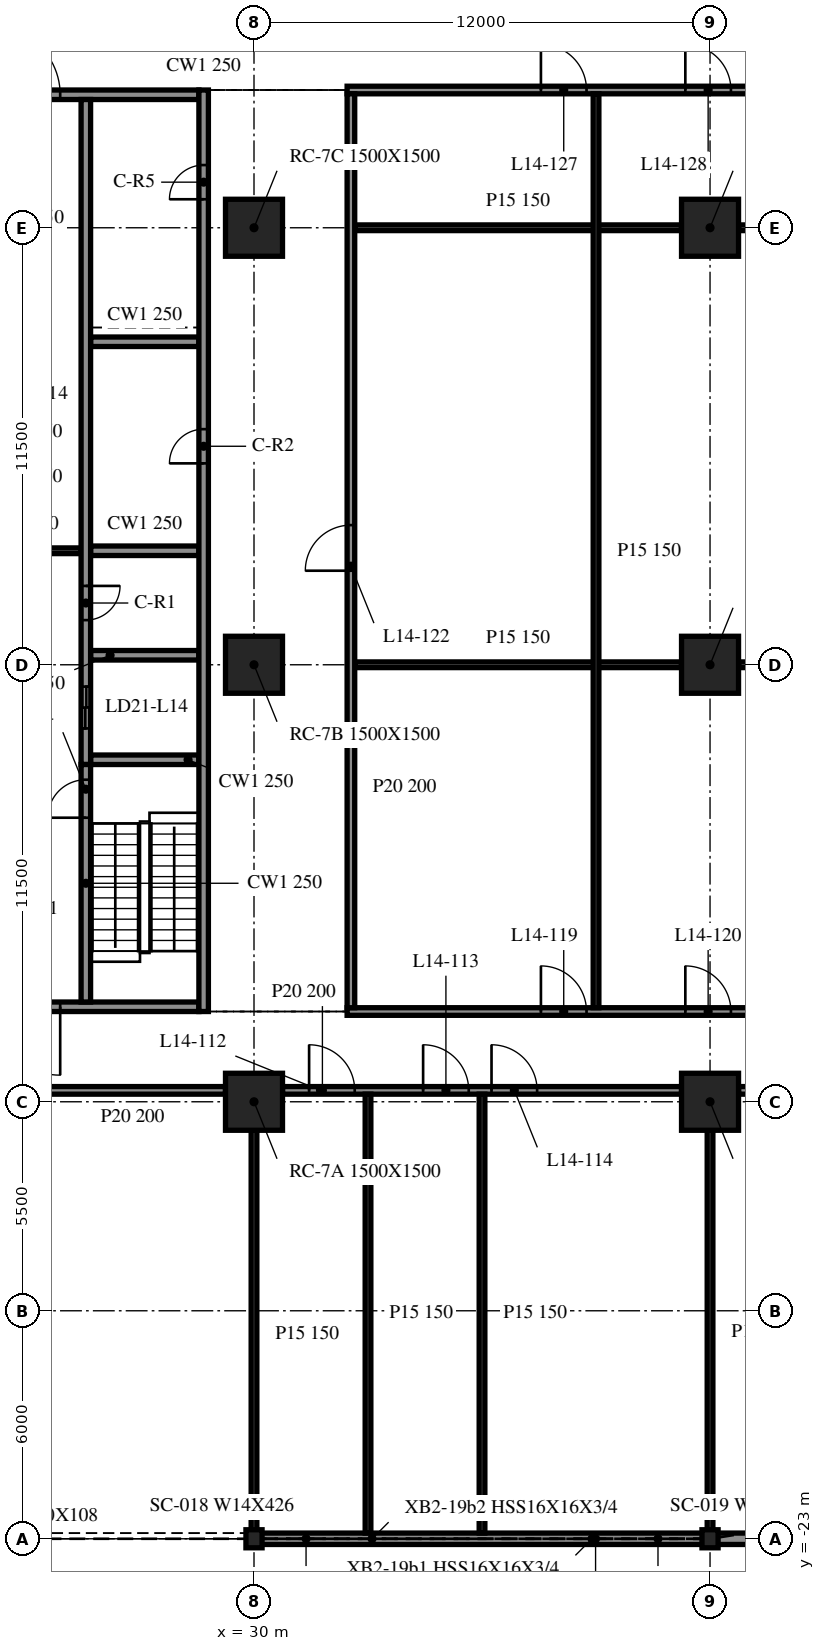
"""IFC4 building model, lengths in metres.
Left out: names, types, materials, properties, quantities, classifications, styles, units other than length and angle.
Written with IfcOpenShell. Run it as: python <this file> out.ifc"""

import sys

from ifc_helpers import new_model, si_unit, direction, frame, frame_2d, origin, origin_2d, place, context, subcontext, project, spatial, rectangle, i_section, extrude, element, fill, save


model = new_model("IFC4")
c1 = context("Model", 3, precision=1e-05, world=origin(), true_north=direction((0.0, 1.0)))
c2 = subcontext(c1, "Body", "Model", "MODEL_VIEW")
j1 = project(units=[si_unit("LENGTHUNIT", "METRE"), si_unit("PLANEANGLEUNIT", "RADIAN")], contexts=[c1])
p1 = place(None, origin())
s1 = spatial("IfcSite", under=j1, at=p1, CompositionType="ELEMENT")
p2 = place(p1, origin())
s2 = spatial("IfcBuilding", under=s1, at=p2, CompositionType="ELEMENT")
p3 = place(p2, frame((0.0, 0.0, 63.2)))
s3 = spatial("IfcBuildingStorey", under=s2, at=p3, CompositionType="ELEMENT", Elevation=63.2)
for number, where, z_axis, x_axis in (
    (1, (30.0, -11.5, -0.34), (0.0, 0.0, 1.0), (1.0, 0.0, 0.0)),
    (2, (30.0, 0.0, -0.34), (0.0, 0.0, 1.0), (1.0, 0.0, 0.0)),
    (3, (30.0, 11.5, -0.34), (0.0, 0.0, 1.0), (1.0, 0.0, 0.0)),
    (4, (42.0, -11.5, -0.34), (0.0, 0.0, 1.0), (1.0, 0.0, 0.0)),
    (5, (42.0, 0.0, -0.34), (0.0, 0.0, 1.0), (1.0, 0.0, 0.0)),
    (6, (42.0, 11.5, -0.34), (0.0, 0.0, 1.0), (1.0, 0.0, 0.0)),
):
    element("IfcColumn", number, at=place(p3, frame(where, z_axis=z_axis, x_axis=x_axis)), inside=s3, PredefinedType="COLUMN", context=c2, shape_type="SweptSolid", body=[
        extrude(rectangle(XDim=1.5, YDim=1.5, at=origin_2d()), origin(), (0.0, 0.0, 1.0), 4.3),
    ])
for number, where, z_axis, x_axis in (
    (7, (30.0, -23.0, -0.34), (0.0, 0.0, 1.0), (1.0, 0.0, 0.0)),
    (8, (42.0, -23.0, -0.34), (0.0, 0.0, 1.0), (1.0, 0.0, 0.0)),
):
    element("IfcColumn", number, at=place(p3, frame(where, z_axis=z_axis, x_axis=x_axis)), inside=s3, PredefinedType="COLUMN", context=c2, shape_type="SweptSolid", body=[
        extrude(i_section(OverallWidth=0.424, OverallDepth=0.475, WebThickness=0.048, FlangeThickness=0.077, at=origin_2d()), origin(), (0.0, 0.0, 1.0), 4.3),
    ])
p4 = place(p3, frame((30.024, -23.0, 0.0), z_axis=(0.0, 0.0, 1.0), x_axis=(1.0, 0.0, 0.0)))
e9 = element("IfcWall", 9, at=p4, inside=s3, PredefinedType="NOTDEFINED", context=c2, shape_type="SweptSolid", body=[
    extrude(rectangle(XDim=11.952, YDim=0.3, at=frame_2d((5.976, 0.0))), origin(), (0.0, 0.0, 1.0), 3.203),
])
p5 = place(p3, frame((42.024, -23.0, 0.0), z_axis=(0.0, 0.0, 1.0), x_axis=(1.0, 0.0, 0.0)))
e10 = element("IfcWall", 10, at=p5, inside=s3, PredefinedType="NOTDEFINED", context=c2, shape_type="SweptSolid", body=[
    extrude(rectangle(XDim=5.976, YDim=0.3, at=frame_2d((2.988, 0.0))), origin(), (0.0, 0.0, 1.0), 3.203),
])
p6 = place(p3, frame((28.675, -9.125, 0.0), z_axis=(0.0, 0.0, 1.0), x_axis=(0.0, 1.0, 0.0)))
e11 = element("IfcWall", 11, at=p6, inside=s3, PredefinedType="SOLIDWALL", context=c2, shape_type="SweptSolid", body=[
    extrude(rectangle(XDim=24.25, YDim=0.25, at=frame_2d((12.125, 0.0))), origin(), (0.0, 0.0, 1.0), 3.96),
])
p7 = place(p6, frame((14.425, 0.0, 0.0)))
e12 = element("IfcOpeningElement", 12, at=p7, cuts=e11, PredefinedType="OPENING", context=c2, shape_type="SweptSolid", body=[
    extrude(rectangle(XDim=0.9, YDim=2.1, at=frame_2d((0.45, 1.05))), frame((0.0, 0.135, 0.0), z_axis=(0.0, -1.0, 0.0), x_axis=(1.0, 0.0, 0.0)), (0.0, 0.0, 1.0), 0.27),
])
p8 = place(p6, frame((21.375, 0.0, 0.0)))
e13 = element("IfcOpeningElement", 13, at=p8, cuts=e11, PredefinedType="OPENING", context=c2, shape_type="SweptSolid", body=[
    extrude(rectangle(XDim=0.9, YDim=2.1, at=frame_2d((0.45, 1.05))), frame((0.0, 0.135, 0.0), z_axis=(0.0, -1.0, 0.0), x_axis=(1.0, 0.0, 0.0)), (0.0, 0.0, 1.0), 0.27),
])
p9 = place(p3, frame((28.55, -9.0, 0.0), z_axis=(0.0, 0.0, 1.0), x_axis=(-1.0, 0.0, 0.0)))
e14 = element("IfcWall", 14, at=p9, inside=s3, PredefinedType="SOLIDWALL", context=c2, shape_type="SweptSolid", body=[
    extrude(rectangle(XDim=9.1, YDim=0.25, at=frame_2d((4.55, 0.0))), origin(), (0.0, 0.0, 1.0), 3.96),
])
p10 = place(p9, frame((3.65, 0.0, 0.0)))
e15 = element("IfcOpeningElement", 15, at=p10, cuts=e14, PredefinedType="OPENING", context=c2, shape_type="SweptSolid", body=[
    extrude(rectangle(XDim=1.8, YDim=2.1, at=frame_2d((0.9, 1.05))), frame((0.0, 0.135, 0.0), z_axis=(0.0, -1.0, 0.0), x_axis=(1.0, 0.0, 0.0)), (0.0, 0.0, 1.0), 0.27),
])
p11 = place(p3, frame((19.45, 15.0, 0.0), z_axis=(0.0, 0.0, 1.0), x_axis=(1.0, 0.0, 0.0)))
e16 = element("IfcWall", 16, at=p11, inside=s3, PredefinedType="SOLIDWALL", context=c2, shape_type="SweptSolid", body=[
    extrude(rectangle(XDim=9.1, YDim=0.25, at=frame_2d((4.55, 0.0))), origin(), (0.0, 0.0, 1.0), 3.96),
])
p12 = place(p11, frame((3.65, 0.0, 0.0)))
e17 = element("IfcOpeningElement", 17, at=p12, cuts=e16, PredefinedType="OPENING", context=c2, shape_type="SweptSolid", body=[
    extrude(rectangle(XDim=1.8, YDim=2.1, at=frame_2d((0.9, 1.05))), frame((0.0, 0.135, 0.0), z_axis=(0.0, -1.0, 0.0), x_axis=(1.0, 0.0, 0.0)), (0.0, 0.0, 1.0), 0.27),
])
p13 = place(p3, frame((25.575, -8.875, 0.0), z_axis=(0.0, 0.0, 1.0), x_axis=(0.0, 1.0, 0.0)))
e18 = element("IfcWall", 18, at=p13, inside=s3, PredefinedType="SOLIDWALL", context=c2, shape_type="SweptSolid", body=[
    extrude(rectangle(XDim=6.25, YDim=0.25, at=frame_2d((3.125, 0.0))), origin(), (0.0, 0.0, 1.0), 3.96),
])
p14 = place(p13, frame((4.85, 0.0, 0.0)))
e19 = element("IfcOpeningElement", 19, at=p14, cuts=e18, PredefinedType="OPENING", context=c2, shape_type="SweptSolid", body=[
    extrude(rectangle(XDim=1.0, YDim=2.1, at=frame_2d((0.5, 1.05))), frame((0.0, 0.135, 0.0), z_axis=(0.0, -1.0, 0.0), x_axis=(1.0, 0.0, 0.0)), (0.0, 0.0, 1.0), 0.27),
])
p15 = place(p3, frame((25.575, 14.875, 0.0), z_axis=(0.0, 0.0, 1.0), x_axis=(0.0, -1.0, 0.0)))
e20 = element("IfcWall", 20, at=p15, inside=s3, PredefinedType="SOLIDWALL", context=c2, shape_type="SweptSolid", body=[
    extrude(rectangle(XDim=17.5, YDim=0.25, at=frame_2d((8.75, 0.0))), origin(), (0.0, 0.0, 1.0), 3.96),
])
p16 = place(p15, frame((15.45, 0.0, 0.0)))
e21 = element("IfcOpeningElement", 21, at=p16, cuts=e20, PredefinedType="OPENING", context=c2, shape_type="SweptSolid", body=[
    extrude(rectangle(XDim=1.1, YDim=2.1, at=frame_2d((0.55, 1.05))), frame((0.0, 0.135, 0.0), z_axis=(0.0, -1.0, 0.0), x_axis=(1.0, 0.0, 0.0)), (0.0, 0.0, 1.0), 0.27),
])
p17 = place(p15, frame((12.8, 0.0, 0.0)))
e22 = element("IfcOpeningElement", 22, at=p17, cuts=e20, PredefinedType="OPENING", context=c2, shape_type="SweptSolid", body=[
    extrude(rectangle(XDim=0.9, YDim=2.1, at=frame_2d((0.45, 1.05))), frame((0.0, 0.135, 0.0), z_axis=(0.0, -1.0, 0.0), x_axis=(1.0, 0.0, 0.0)), (0.0, 0.0, 1.0), 0.27),
])
for number, where, z_axis, x_axis in (
    (23, (25.7, -2.5, 0.0), (0.0, 0.0, 1.0), (1.0, 0.0, 0.0)),
    (24, (25.7, 0.25, 0.0), (0.0, 0.0, 1.0), (1.0, 0.0, 0.0)),
    (25, (25.7, 3.0, 0.0), (0.0, 0.0, 1.0), (1.0, 0.0, 0.0)),
    (26, (25.7, 8.5, 0.0), (0.0, 0.0, 1.0), (1.0, 0.0, 0.0)),
):
    element("IfcWall", number, at=place(p3, frame(where, z_axis=z_axis, x_axis=x_axis)), inside=s3, PredefinedType="SOLIDWALL", context=c2, shape_type="SweptSolid", body=[
        extrude(rectangle(XDim=2.85, YDim=0.25, at=frame_2d((1.425, 0.0))), origin(), (0.0, 0.0, 1.0), 3.96),
    ])
p18 = place(p3, frame((22.55, 3.0, 0.0), z_axis=(0.0, 0.0, 1.0), x_axis=(1.0, 0.0, 0.0)))
e27 = element("IfcWall", 27, at=p18, inside=s3, PredefinedType="PARTITIONING", context=c2, shape_type="SweptSolid", body=[
    extrude(rectangle(XDim=2.9, YDim=0.15, at=frame_2d((1.45, 0.0))), origin(), (0.0, 0.0, 1.0), 3.96),
])
p19 = place(p3, frame((18.75, -11.2, 0.0), z_axis=(0.0, 0.0, 1.0), x_axis=(1.0, 0.0, 0.0)))
e28 = element("IfcWall", 28, at=p19, inside=s3, PredefinedType="PARTITIONING", context=c2, shape_type="SweptSolid", body=[
    extrude(rectangle(XDim=10.5, YDim=0.2, at=frame_2d((5.25, 0.0))), origin(), (0.0, 0.0, 1.0), 3.96),
])
p20 = place(p19, frame((4.7, 0.0, 0.0)))
e29 = element("IfcOpeningElement", 29, at=p20, cuts=e28, PredefinedType="OPENING", context=c2, shape_type="SweptSolid", body=[
    extrude(rectangle(XDim=1.0, YDim=2.1, at=frame_2d((0.5, 1.05))), frame((0.0, 0.11, 0.0), z_axis=(0.0, -1.0, 0.0), x_axis=(1.0, 0.0, 0.0)), (0.0, 0.0, 1.0), 0.22),
])
p21 = place(p3, frame((30.75, -11.2, 0.0), z_axis=(0.0, 0.0, 1.0), x_axis=(1.0, 0.0, 0.0)))
e30 = element("IfcWall", 30, at=p21, inside=s3, PredefinedType="PARTITIONING", context=c2, shape_type="SweptSolid", body=[
    extrude(rectangle(XDim=10.5, YDim=0.2, at=frame_2d((5.25, 0.0))), origin(), (0.0, 0.0, 1.0), 3.96),
])
p22 = place(p21, frame((0.7, 0.0, 0.0)))
e31 = element("IfcOpeningElement", 31, at=p22, cuts=e30, PredefinedType="OPENING", context=c2, shape_type="SweptSolid", body=[
    extrude(rectangle(XDim=1.2, YDim=2.1, at=frame_2d((0.6, 1.05))), frame((0.0, 0.11, 0.0), z_axis=(0.0, -1.0, 0.0), x_axis=(1.0, 0.0, 0.0)), (0.0, 0.0, 1.0), 0.22),
])
p23 = place(p21, frame((3.7, 0.0, 0.0)))
e32 = element("IfcOpeningElement", 32, at=p23, cuts=e30, PredefinedType="OPENING", context=c2, shape_type="SweptSolid", body=[
    extrude(rectangle(XDim=1.2, YDim=2.1, at=frame_2d((0.6, 1.05))), frame((0.0, 0.11, 0.0), z_axis=(0.0, -1.0, 0.0), x_axis=(1.0, 0.0, 0.0)), (0.0, 0.0, 1.0), 0.22),
])
p24 = place(p21, frame((5.5, 0.0, 0.0)))
e33 = element("IfcOpeningElement", 33, at=p24, cuts=e30, PredefinedType="OPENING", context=c2, shape_type="SweptSolid", body=[
    extrude(rectangle(XDim=1.2, YDim=2.1, at=frame_2d((0.6, 1.05))), frame((0.0, 0.11, 0.0), z_axis=(0.0, -1.0, 0.0), x_axis=(1.0, 0.0, 0.0)), (0.0, 0.0, 1.0), 0.22),
])
p25 = place(p3, frame((42.75, -11.2, 0.0), z_axis=(0.0, 0.0, 1.0), x_axis=(1.0, 0.0, 0.0)))
e34 = element("IfcWall", 34, at=p25, inside=s3, PredefinedType="PARTITIONING", context=c2, shape_type="SweptSolid", body=[
    extrude(rectangle(XDim=11.1, YDim=0.2, at=frame_2d((5.55, 0.0))), origin(), (0.0, 0.0, 1.0), 3.96),
])
p26 = place(p25, frame((4.9, 0.0, 0.0)))
e35 = element("IfcOpeningElement", 35, at=p26, cuts=e34, PredefinedType="OPENING", context=c2, shape_type="SweptSolid", body=[
    extrude(rectangle(XDim=1.2, YDim=2.1, at=frame_2d((0.6, 1.05))), frame((0.0, 0.11, 0.0), z_axis=(0.0, -1.0, 0.0), x_axis=(1.0, 0.0, 0.0)), (0.0, 0.0, 1.0), 0.22),
])
p27 = place(p3, frame((32.45, -9.125, 0.0), z_axis=(0.0, 0.0, 1.0), x_axis=(1.0, 0.0, 0.0)))
e36 = element("IfcWall", 36, at=p27, inside=s3, PredefinedType="PARTITIONING", context=c2, shape_type="SweptSolid", body=[
    extrude(rectangle(XDim=19.1, YDim=0.2, at=frame_2d((9.55, 0.0))), origin(), (0.0, 0.0, 1.0), 3.96),
])
p28 = place(p27, frame((5.1, 0.0, 0.0)))
e37 = element("IfcOpeningElement", 37, at=p28, cuts=e36, PredefinedType="OPENING", context=c2, shape_type="SweptSolid", body=[
    extrude(rectangle(XDim=1.2, YDim=2.1, at=frame_2d((0.6, 1.05))), frame((0.0, 0.11, 0.0), z_axis=(0.0, -1.0, 0.0), x_axis=(1.0, 0.0, 0.0)), (0.0, 0.0, 1.0), 0.22),
])
p29 = place(p27, frame((8.9, 0.0, 0.0)))
e38 = element("IfcOpeningElement", 38, at=p29, cuts=e36, PredefinedType="OPENING", context=c2, shape_type="SweptSolid", body=[
    extrude(rectangle(XDim=1.2, YDim=2.1, at=frame_2d((0.6, 1.05))), frame((0.0, 0.11, 0.0), z_axis=(0.0, -1.0, 0.0), x_axis=(1.0, 0.0, 0.0)), (0.0, 0.0, 1.0), 0.22),
])
for number, where, z_axis, x_axis in (
    (39, (32.65, 0.0, 0.0), (0.0, 0.0, 1.0), (1.0, 0.0, 0.0)),
    (40, (42.75, 0.0, 0.0), (0.0, 0.0, 1.0), (1.0, 0.0, 0.0)),
    (41, (32.65, 11.5, 0.0), (0.0, 0.0, 1.0), (1.0, 0.0, 0.0)),
    (42, (42.75, 11.5, 0.0), (0.0, 0.0, 1.0), (1.0, 0.0, 0.0)),
):
    element("IfcWall", number, at=place(p3, frame(where, z_axis=z_axis, x_axis=x_axis)), inside=s3, PredefinedType="PARTITIONING", context=c2, shape_type="SweptSolid", body=[
        extrude(rectangle(XDim=8.6, YDim=0.15, at=frame_2d((4.3, 0.0))), origin(), (0.0, 0.0, 1.0), 3.96),
    ])
p30 = place(p3, frame((32.45, 15.125, 0.0), z_axis=(0.0, 0.0, 1.0), x_axis=(1.0, 0.0, 0.0)))
e43 = element("IfcWall", 43, at=p30, inside=s3, PredefinedType="PARTITIONING", context=c2, shape_type="SweptSolid", body=[
    extrude(rectangle(XDim=19.1, YDim=0.2, at=frame_2d((9.55, 0.0))), origin(), (0.0, 0.0, 1.0), 3.96),
])
p31 = place(p30, frame((5.1, 0.0, 0.0)))
e44 = element("IfcOpeningElement", 44, at=p31, cuts=e43, PredefinedType="OPENING", context=c2, shape_type="SweptSolid", body=[
    extrude(rectangle(XDim=1.2, YDim=2.1, at=frame_2d((0.6, 1.05))), frame((0.0, 0.11, 0.0), z_axis=(0.0, -1.0, 0.0), x_axis=(1.0, 0.0, 0.0)), (0.0, 0.0, 1.0), 0.22),
])
p32 = place(p30, frame((8.9, 0.0, 0.0)))
e45 = element("IfcOpeningElement", 45, at=p32, cuts=e43, PredefinedType="OPENING", context=c2, shape_type="SweptSolid", body=[
    extrude(rectangle(XDim=1.2, YDim=2.1, at=frame_2d((0.6, 1.05))), frame((0.0, 0.11, 0.0), z_axis=(0.0, -1.0, 0.0), x_axis=(1.0, 0.0, 0.0)), (0.0, 0.0, 1.0), 0.22),
])
p33 = place(p3, frame((30.0, -22.975, 0.0), z_axis=(0.0, 0.0, 1.0), x_axis=(0.0, 1.0, 0.0)))
e46 = element("IfcWall", 46, at=p33, inside=s3, PredefinedType="PARTITIONING", context=c2, shape_type="SweptSolid", body=[
    extrude(rectangle(XDim=10.725, YDim=0.15, at=frame_2d((5.363, 0.0))), origin(), (0.0, 0.0, 1.0), 3.96),
])
p34 = place(p3, frame((32.55, -9.025, 0.0), z_axis=(0.0, 0.0, 1.0), x_axis=(0.0, 1.0, 0.0)))
e47 = element("IfcWall", 47, at=p34, inside=s3, PredefinedType="PARTITIONING", context=c2, shape_type="SweptSolid", body=[
    extrude(rectangle(XDim=24.05, YDim=0.2, at=frame_2d((12.025, 0.0))), origin(), (0.0, 0.0, 1.0), 3.96),
])
p35 = place(p34, frame((11.5, 0.0, 0.0)))
e48 = element("IfcOpeningElement", 48, at=p35, cuts=e47, PredefinedType="OPENING", context=c2, shape_type="SweptSolid", body=[
    extrude(rectangle(XDim=1.2, YDim=2.1, at=frame_2d((0.6, 1.05))), frame((0.0, 0.11, 0.0), z_axis=(0.0, -1.0, 0.0), x_axis=(1.0, 0.0, 0.0)), (0.0, 0.0, 1.0), 0.22),
])
for number, where, z_axis, x_axis in (
    (49, (33.0, -22.85, 0.0), (0.0, 0.0, 1.0), (0.0, 1.0, 0.0)),
    (50, (36.0, -22.85, 0.0), (0.0, 0.0, 1.0), (0.0, 1.0, 0.0)),
):
    element("IfcWall", number, at=place(p3, frame(where, z_axis=z_axis, x_axis=x_axis)), inside=s3, PredefinedType="PARTITIONING", context=c2, shape_type="SweptSolid", body=[
        extrude(rectangle(XDim=11.55, YDim=0.15, at=frame_2d((5.775, 0.0))), origin(), (0.0, 0.0, 1.0), 3.96),
    ])
p36 = place(p3, frame((39.0, -9.025, 0.0), z_axis=(0.0, 0.0, 1.0), x_axis=(0.0, 1.0, 0.0)))
e51 = element("IfcWall", 51, at=p36, inside=s3, PredefinedType="PARTITIONING", context=c2, shape_type="SweptSolid", body=[
    extrude(rectangle(XDim=24.05, YDim=0.15, at=frame_2d((12.025, 0.0))), origin(), (0.0, 0.0, 1.0), 3.96),
])
p37 = place(p3, frame((42.0, -22.85, 0.0), z_axis=(0.0, 0.0, 1.0), x_axis=(0.0, 1.0, 0.0)))
e52 = element("IfcWall", 52, at=p37, inside=s3, PredefinedType="PARTITIONING", context=c2, shape_type="SweptSolid", body=[
    extrude(rectangle(XDim=10.6, YDim=0.15, at=frame_2d((5.3, 0.0))), origin(), (0.0, 0.0, 1.0), 3.96),
])
p38 = place(p10, origin())
e53 = element("IfcDoor", 53, at=p38, inside=s3, OperationType="DOUBLE_DOOR_SINGLE_SWING", PredefinedType="DOOR", context=c2, shape_type="SweptSolid", body=[
    extrude(rectangle(XDim=1.8, YDim=2.1, at=frame_2d((0.9, 1.05))), frame((0.0, 0.025, 0.0), z_axis=(0.0, -1.0, 0.0), x_axis=(1.0, 0.0, 0.0)), (0.0, 0.0, 1.0), 0.05),
])
fill(e15, e53)
p39 = place(p12, origin())
e54 = element("IfcDoor", 54, at=p39, inside=s3, OperationType="DOUBLE_DOOR_SINGLE_SWING", PredefinedType="DOOR", context=c2, shape_type="SweptSolid", body=[
    extrude(rectangle(XDim=1.8, YDim=2.1, at=frame_2d((0.9, 1.05))), frame((0.0, 0.025, 0.0), z_axis=(0.0, -1.0, 0.0), x_axis=(1.0, 0.0, 0.0)), (0.0, 0.0, 1.0), 0.05),
])
fill(e17, e54)
p40 = place(p16, origin())
e55 = element("IfcDoor", 55, at=p40, inside=s3, OperationType="DOUBLE_DOOR_SLIDING", PredefinedType="DOOR", context=c2, shape_type="SweptSolid", body=[
    extrude(rectangle(XDim=1.1, YDim=2.1, at=frame_2d((0.55, 1.05))), frame((0.0, 0.025, 0.0), z_axis=(0.0, -1.0, 0.0), x_axis=(1.0, 0.0, 0.0)), (0.0, 0.0, 1.0), 0.05),
])
fill(e21, e55)
p41 = place(p17, origin())
e56 = element("IfcDoor", 56, at=p41, inside=s3, OperationType="SINGLE_SWING_LEFT", PredefinedType="DOOR", context=c2, shape_type="SweptSolid", body=[
    extrude(rectangle(XDim=0.9, YDim=2.1, at=frame_2d((0.45, 1.05))), frame((0.0, 0.025, 0.0), z_axis=(0.0, -1.0, 0.0), x_axis=(1.0, 0.0, 0.0)), (0.0, 0.0, 1.0), 0.05),
])
fill(e22, e56)
p42 = place(p7, origin())
e57 = element("IfcDoor", 57, at=p42, inside=s3, OperationType="SINGLE_SWING_RIGHT", PredefinedType="DOOR", context=c2, shape_type="SweptSolid", body=[
    extrude(rectangle(XDim=0.9, YDim=2.1, at=frame_2d((0.45, 1.05))), frame((0.0, 0.025, 0.0), z_axis=(0.0, -1.0, 0.0), x_axis=(1.0, 0.0, 0.0)), (0.0, 0.0, 1.0), 0.05),
])
fill(e12, e57)
p43 = place(p8, origin())
e58 = element("IfcDoor", 58, at=p43, inside=s3, OperationType="SINGLE_SWING_LEFT", PredefinedType="DOOR", context=c2, shape_type="SweptSolid", body=[
    extrude(rectangle(XDim=0.9, YDim=2.1, at=frame_2d((0.45, 1.05))), frame((0.0, 0.025, 0.0), z_axis=(0.0, -1.0, 0.0), x_axis=(1.0, 0.0, 0.0)), (0.0, 0.0, 1.0), 0.05),
])
fill(e13, e58)
p44 = place(p14, origin())
e59 = element("IfcDoor", 59, at=p44, inside=s3, OperationType="SINGLE_SWING_LEFT", PredefinedType="DOOR", context=c2, shape_type="SweptSolid", body=[
    extrude(rectangle(XDim=1.0, YDim=2.1, at=frame_2d((0.5, 1.05))), frame((0.0, 0.025, 0.0), z_axis=(0.0, -1.0, 0.0), x_axis=(1.0, 0.0, 0.0)), (0.0, 0.0, 1.0), 0.05),
])
fill(e19, e59)
p45 = place(p22, origin())
e60 = element("IfcDoor", 60, at=p45, inside=s3, OperationType="SINGLE_SWING_RIGHT", PredefinedType="DOOR", context=c2, shape_type="SweptSolid", body=[
    extrude(rectangle(XDim=1.2, YDim=2.1, at=frame_2d((0.6, 1.05))), frame((0.0, 0.025, 0.0), z_axis=(0.0, -1.0, 0.0), x_axis=(1.0, 0.0, 0.0)), (0.0, 0.0, 1.0), 0.05),
])
fill(e31, e60)
p46 = place(p23, origin())
e61 = element("IfcDoor", 61, at=p46, inside=s3, OperationType="SINGLE_SWING_RIGHT", PredefinedType="DOOR", context=c2, shape_type="SweptSolid", body=[
    extrude(rectangle(XDim=1.2, YDim=2.1, at=frame_2d((0.6, 1.05))), frame((0.0, 0.025, 0.0), z_axis=(0.0, -1.0, 0.0), x_axis=(1.0, 0.0, 0.0)), (0.0, 0.0, 1.0), 0.05),
])
fill(e32, e61)
p47 = place(p24, origin())
e62 = element("IfcDoor", 62, at=p47, inside=s3, OperationType="SINGLE_SWING_LEFT", PredefinedType="DOOR", context=c2, shape_type="SweptSolid", body=[
    extrude(rectangle(XDim=1.2, YDim=2.1, at=frame_2d((0.6, 1.05))), frame((0.0, 0.025, 0.0), z_axis=(0.0, -1.0, 0.0), x_axis=(1.0, 0.0, 0.0)), (0.0, 0.0, 1.0), 0.05),
])
fill(e33, e62)
p48 = place(p28, origin())
e63 = element("IfcDoor", 63, at=p48, inside=s3, OperationType="SINGLE_SWING_LEFT", PredefinedType="DOOR", context=c2, shape_type="SweptSolid", body=[
    extrude(rectangle(XDim=1.2, YDim=2.1, at=frame_2d((0.6, 1.05))), frame((0.0, 0.025, 0.0), z_axis=(0.0, -1.0, 0.0), x_axis=(1.0, 0.0, 0.0)), (0.0, 0.0, 1.0), 0.05),
])
fill(e37, e63)
p49 = place(p29, origin())
e64 = element("IfcDoor", 64, at=p49, inside=s3, OperationType="SINGLE_SWING_LEFT", PredefinedType="DOOR", context=c2, shape_type="SweptSolid", body=[
    extrude(rectangle(XDim=1.2, YDim=2.1, at=frame_2d((0.6, 1.05))), frame((0.0, 0.025, 0.0), z_axis=(0.0, -1.0, 0.0), x_axis=(1.0, 0.0, 0.0)), (0.0, 0.0, 1.0), 0.05),
])
fill(e38, e64)
p50 = place(p35, origin())
e65 = element("IfcDoor", 65, at=p50, inside=s3, OperationType="SINGLE_SWING_LEFT", PredefinedType="DOOR", context=c2, shape_type="SweptSolid", body=[
    extrude(rectangle(XDim=1.2, YDim=2.1, at=frame_2d((0.6, 1.05))), frame((0.0, 0.025, 0.0), z_axis=(0.0, -1.0, 0.0), x_axis=(1.0, 0.0, 0.0)), (0.0, 0.0, 1.0), 0.05),
])
fill(e48, e65)
p51 = place(p31, origin())
e66 = element("IfcDoor", 66, at=p51, inside=s3, OperationType="SINGLE_SWING_RIGHT", PredefinedType="DOOR", context=c2, shape_type="SweptSolid", body=[
    extrude(rectangle(XDim=1.2, YDim=2.1, at=frame_2d((0.6, 1.05))), frame((0.0, 0.025, 0.0), z_axis=(0.0, -1.0, 0.0), x_axis=(1.0, 0.0, 0.0)), (0.0, 0.0, 1.0), 0.05),
])
fill(e44, e66)
p52 = place(p32, origin())
e67 = element("IfcDoor", 67, at=p52, inside=s3, OperationType="SINGLE_SWING_RIGHT", PredefinedType="DOOR", context=c2, shape_type="SweptSolid", body=[
    extrude(rectangle(XDim=1.2, YDim=2.1, at=frame_2d((0.6, 1.05))), frame((0.0, 0.025, 0.0), z_axis=(0.0, -1.0, 0.0), x_axis=(1.0, 0.0, 0.0)), (0.0, 0.0, 1.0), 0.05),
])
fill(e45, e67)
save(model, sys.argv[1])
